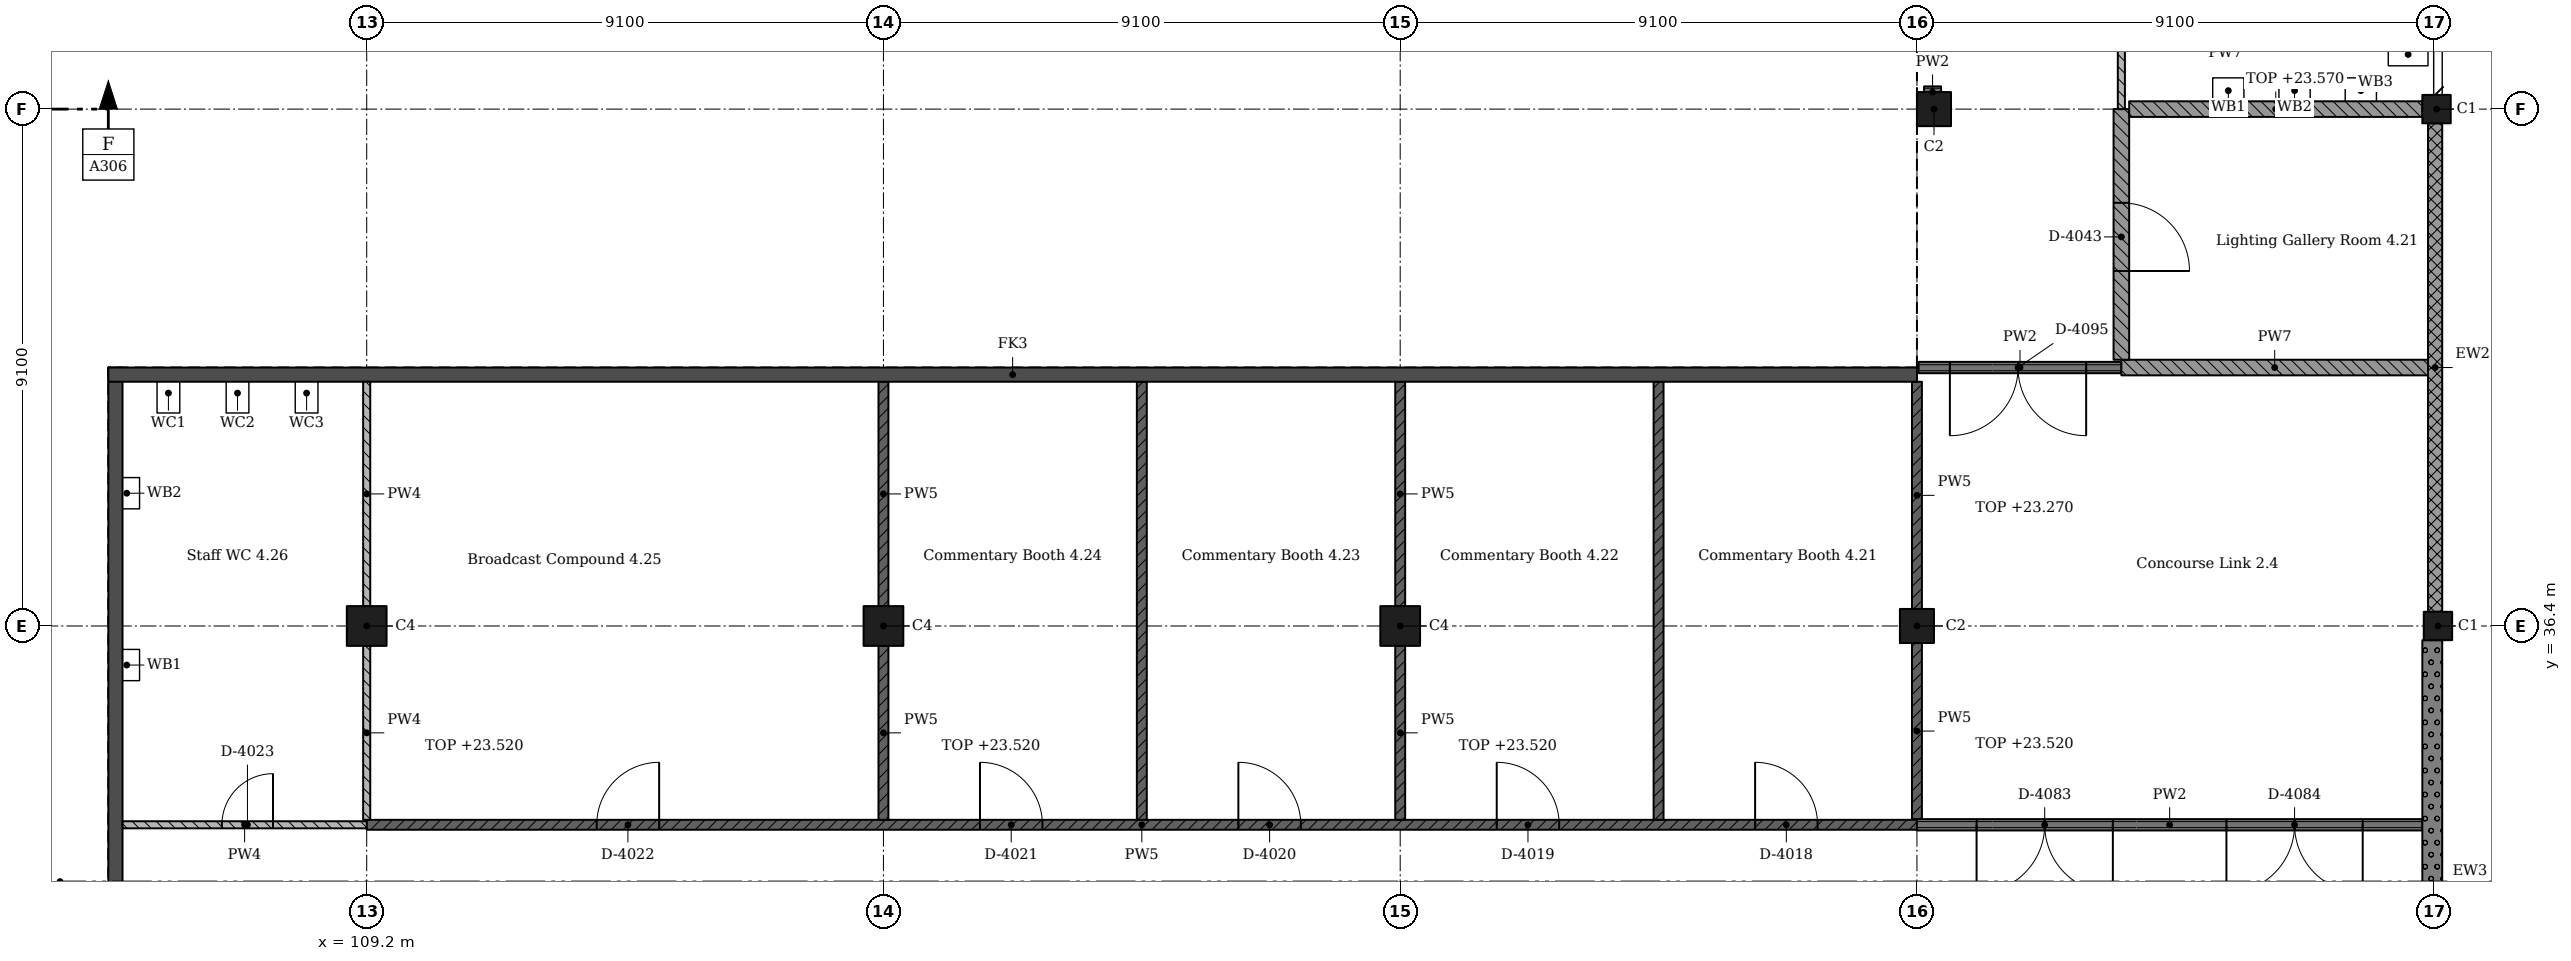
"""IFC4 building model, lengths in metres.
Left out: names, types, materials, properties, quantities, classifications, styles, units other than length and angle.
Written with IfcOpenShell. Run it as: python <this file> out.ifc"""

import sys

from ifc_helpers import new_model, si_unit, direction, frame, frame_2d, origin, origin_2d, place, context, subcontext, project, spatial, rectangle, extrude, element, fill, save


model = new_model("IFC4")
c1 = context("Model", 3, precision=1e-05, world=origin(), true_north=direction((0.0, 1.0)))
c2 = subcontext(c1, "Body", "Model", "MODEL_VIEW")
j1 = project(units=[si_unit("LENGTHUNIT", "METRE"), si_unit("PLANEANGLEUNIT", "RADIAN")], contexts=[c1])
p1 = place(None, origin())
s1 = spatial("IfcSite", under=j1, at=p1, CompositionType="ELEMENT")
p2 = place(p1, origin())
s2 = spatial("IfcBuilding", under=s1, at=p2, CompositionType="ELEMENT")
p3 = place(p2, frame((0.0, 0.0, 20.02)))
s3 = spatial("IfcBuildingStorey", under=s2, at=p3, CompositionType="ELEMENT", Elevation=20.02)
for number, where, z_axis, x_axis in (
    (1, (109.2, 36.4, 0.0), (0.0, 0.0, 1.0), (1.0, 0.0, 0.0)),
    (2, (118.3, 36.4, 0.0), (0.0, 0.0, 1.0), (1.0, 0.0, 0.0)),
    (3, (127.4, 36.4, 0.0), (0.0, 0.0, 1.0), (1.0, 0.0, 0.0)),
):
    element("IfcColumn", number, at=place(p3, frame(where, z_axis=z_axis, x_axis=x_axis)), inside=s3, PredefinedType="COLUMN", context=c2, shape_type="SweptSolid", body=[
        extrude(rectangle(XDim=0.7, YDim=0.7, at=origin_2d()), origin(), (0.0, 0.0, 1.0), 4.55),
    ])
for number, where, z_axis, x_axis in (
    (4, (136.5, 36.4, 0.0), (0.0, 0.0, 1.0), (1.0, 0.0, 0.0)),
    (5, (136.8, 45.5, 0.0), (0.0, 0.0, 1.0), (1.0, 0.0, 0.0)),
):
    element("IfcColumn", number, at=place(p3, frame(where, z_axis=z_axis, x_axis=x_axis)), inside=s3, PredefinedType="COLUMN", context=c2, shape_type="SweptSolid", body=[
        extrude(rectangle(XDim=0.6, YDim=0.6, at=origin_2d()), origin(), (0.0, 0.0, 1.0), 4.55),
    ])
for number, where, z_axis, x_axis in (
    (6, (145.675, 36.4, 0.0), (0.0, 0.0, 1.0), (1.0, 0.0, 0.0)),
    (7, (145.65, 45.5, 0.0), (0.0, 0.0, 1.0), (1.0, 0.0, 0.0)),
):
    element("IfcColumn", number, at=place(p3, frame(where, z_axis=z_axis, x_axis=x_axis)), inside=s3, PredefinedType="COLUMN", context=c2, shape_type="SweptSolid", body=[
        extrude(rectangle(XDim=0.5, YDim=0.5, at=origin_2d()), origin(), (0.0, 0.0, 1.0), 4.55),
    ])
p4 = place(p3, frame((104.775, 40.95, 0.0), z_axis=(0.0, 0.0, 1.0), x_axis=(0.0, -1.0, 0.0)))
e8 = element("IfcWall", 8, at=p4, inside=s3, PredefinedType="SHEAR", context=c2, shape_type="SweptSolid", body=[
    extrude(rectangle(XDim=31.85, YDim=0.25, at=frame_2d((15.925, 0.0))), origin(), (0.0, 0.0, 1.0), 4.55),
])
p5 = place(p3, frame((104.65, 40.825, 0.0), z_axis=(0.0, 0.0, 1.0), x_axis=(1.0, 0.0, 0.0)))
e9 = element("IfcWall", 9, at=p5, inside=s3, PredefinedType="SHEAR", context=c2, shape_type="SweptSolid", body=[
    extrude(rectangle(XDim=31.85, YDim=0.25, at=frame_2d((15.925, 0.0))), origin(), (0.0, 0.0, 1.0), 4.55),
])
p6 = place(p3, frame((145.575, 27.55, 0.0), z_axis=(0.0, 0.0, 1.0), x_axis=(0.0, 1.0, 0.0)))
e10 = element("IfcWall", 10, at=p6, inside=s3, PredefinedType="SOLIDWALL", context=c2, shape_type="SweptSolid", body=[
    extrude(rectangle(XDim=8.6, YDim=0.35, at=frame_2d((4.3, 0.0))), origin(), (0.0, 0.0, 1.0), 3.5),
])
p7 = place(p3, frame((145.625, 36.65, 0.0), z_axis=(0.0, 0.0, 1.0), x_axis=(0.0, 1.0, 0.0)))
e11 = element("IfcWall", 11, at=p7, inside=s3, PredefinedType="SOLIDWALL", context=c2, shape_type="SweptSolid", body=[
    extrude(rectangle(XDim=8.6, YDim=0.25, at=frame_2d((4.3, 0.0))), origin(), (0.0, 0.0, 1.0), 3.5),
])
p8 = place(p3, frame((109.2, 32.9, 0.0), z_axis=(0.0, 0.0, 1.0), x_axis=(-1.0, 0.0, 0.0)))
e12 = element("IfcWall", 12, at=p8, inside=s3, PredefinedType="PARTITIONING", context=c2, shape_type="SweptSolid", body=[
    extrude(rectangle(XDim=4.3, YDim=0.125, at=frame_2d((2.15, 0.0))), origin(), (0.0, 0.0, 1.0), 4.25),
])
p9 = place(p8, frame((1.65, 0.0, 0.0)))
e13 = element("IfcOpeningElement", 13, at=p9, cuts=e12, PredefinedType="OPENING", context=c2, shape_type="SweptSolid", body=[
    extrude(rectangle(XDim=0.9, YDim=2.1, at=frame_2d((0.45, 1.05))), frame((0.0, 0.073, 0.0), z_axis=(0.0, -1.0, 0.0), x_axis=(1.0, 0.0, 0.0)), (0.0, 0.0, 1.0), 0.145),
])
p10 = place(p3, frame((109.2, 32.988, 0.0), z_axis=(0.0, 0.0, 1.0), x_axis=(0.0, 1.0, 0.0)))
e14 = element("IfcWall", 14, at=p10, inside=s3, PredefinedType="PARTITIONING", context=c2, shape_type="SweptSolid", body=[
    extrude(rectangle(XDim=3.062, YDim=0.125, at=frame_2d((1.531, 0.0))), origin(), (0.0, 0.0, 1.0), 3.5),
])
p11 = place(p3, frame((109.2, 36.75, 0.0), z_axis=(0.0, 0.0, 1.0), x_axis=(0.0, 1.0, 0.0)))
e15 = element("IfcWall", 15, at=p11, inside=s3, PredefinedType="PARTITIONING", context=c2, shape_type="SweptSolid", body=[
    extrude(rectangle(XDim=3.95, YDim=0.125, at=frame_2d((1.975, 0.0))), origin(), (0.0, 0.0, 1.0), 4.25),
])
p12 = place(p3, frame((109.2, 32.9, 0.0), z_axis=(0.0, 0.0, 1.0), x_axis=(1.0, 0.0, 0.0)))
e16 = element("IfcWall", 16, at=p12, inside=s3, PredefinedType="PARTITIONING", context=c2, shape_type="SweptSolid", body=[
    extrude(rectangle(XDim=27.3, YDim=0.175, at=frame_2d((13.65, 0.0))), origin(), (0.0, 0.0, 1.0), 4.25),
])
p13 = place(p12, frame((24.45, 0.0, 0.0)))
e17 = element("IfcOpeningElement", 17, at=p13, cuts=e16, PredefinedType="OPENING", context=c2, shape_type="SweptSolid", body=[
    extrude(rectangle(XDim=1.1, YDim=2.4, at=frame_2d((0.55, 1.2))), frame((0.0, 0.097, 0.0), z_axis=(0.0, -1.0, 0.0), x_axis=(1.0, 0.0, 0.0)), (0.0, 0.0, 1.0), 0.195),
])
p14 = place(p12, frame((19.9, 0.0, 0.0)))
e18 = element("IfcOpeningElement", 18, at=p14, cuts=e16, PredefinedType="OPENING", context=c2, shape_type="SweptSolid", body=[
    extrude(rectangle(XDim=1.1, YDim=2.4, at=frame_2d((0.55, 1.2))), frame((0.0, 0.097, 0.0), z_axis=(0.0, -1.0, 0.0), x_axis=(1.0, 0.0, 0.0)), (0.0, 0.0, 1.0), 0.195),
])
p15 = place(p12, frame((15.35, 0.0, 0.0)))
e19 = element("IfcOpeningElement", 19, at=p15, cuts=e16, PredefinedType="OPENING", context=c2, shape_type="SweptSolid", body=[
    extrude(rectangle(XDim=1.1, YDim=2.4, at=frame_2d((0.55, 1.2))), frame((0.0, 0.097, 0.0), z_axis=(0.0, -1.0, 0.0), x_axis=(1.0, 0.0, 0.0)), (0.0, 0.0, 1.0), 0.195),
])
p16 = place(p12, frame((10.8, 0.0, 0.0)))
e20 = element("IfcOpeningElement", 20, at=p16, cuts=e16, PredefinedType="OPENING", context=c2, shape_type="SweptSolid", body=[
    extrude(rectangle(XDim=1.1, YDim=2.4, at=frame_2d((0.55, 1.2))), frame((0.0, 0.097, 0.0), z_axis=(0.0, -1.0, 0.0), x_axis=(1.0, 0.0, 0.0)), (0.0, 0.0, 1.0), 0.195),
])
p17 = place(p12, frame((4.05, 0.0, 0.0)))
e21 = element("IfcOpeningElement", 21, at=p17, cuts=e16, PredefinedType="OPENING", context=c2, shape_type="SweptSolid", body=[
    extrude(rectangle(XDim=1.1, YDim=2.4, at=frame_2d((0.55, 1.2))), frame((0.0, 0.097, 0.0), z_axis=(0.0, -1.0, 0.0), x_axis=(1.0, 0.0, 0.0)), (0.0, 0.0, 1.0), 0.195),
])
p18 = place(p3, frame((118.3, 32.988, 0.0), z_axis=(0.0, 0.0, 1.0), x_axis=(0.0, 1.0, 0.0)))
e22 = element("IfcWall", 22, at=p18, inside=s3, PredefinedType="PARTITIONING", context=c2, shape_type="SweptSolid", body=[
    extrude(rectangle(XDim=3.062, YDim=0.175, at=frame_2d((1.531, 0.0))), origin(), (0.0, 0.0, 1.0), 3.5),
])
p19 = place(p3, frame((118.3, 36.75, 0.0), z_axis=(0.0, 0.0, 1.0), x_axis=(0.0, 1.0, 0.0)))
e23 = element("IfcWall", 23, at=p19, inside=s3, PredefinedType="PARTITIONING", context=c2, shape_type="SweptSolid", body=[
    extrude(rectangle(XDim=3.95, YDim=0.175, at=frame_2d((1.975, 0.0))), origin(), (0.0, 0.0, 1.0), 4.25),
])
p20 = place(p3, frame((122.85, 32.988, 0.0), z_axis=(0.0, 0.0, 1.0), x_axis=(0.0, 1.0, 0.0)))
e24 = element("IfcWall", 24, at=p20, inside=s3, PredefinedType="PARTITIONING", context=c2, shape_type="SweptSolid", body=[
    extrude(rectangle(XDim=7.712, YDim=0.175, at=frame_2d((3.856, 0.0))), origin(), (0.0, 0.0, 1.0), 4.25),
])
p21 = place(p3, frame((127.4, 32.988, 0.0), z_axis=(0.0, 0.0, 1.0), x_axis=(0.0, 1.0, 0.0)))
e25 = element("IfcWall", 25, at=p21, inside=s3, PredefinedType="PARTITIONING", context=c2, shape_type="SweptSolid", body=[
    extrude(rectangle(XDim=3.062, YDim=0.175, at=frame_2d((1.531, 0.0))), origin(), (0.0, 0.0, 1.0), 3.5),
])
p22 = place(p3, frame((127.4, 36.75, 0.0), z_axis=(0.0, 0.0, 1.0), x_axis=(0.0, 1.0, 0.0)))
e26 = element("IfcWall", 26, at=p22, inside=s3, PredefinedType="PARTITIONING", context=c2, shape_type="SweptSolid", body=[
    extrude(rectangle(XDim=3.95, YDim=0.175, at=frame_2d((1.975, 0.0))), origin(), (0.0, 0.0, 1.0), 4.25),
])
p23 = place(p3, frame((131.95, 32.988, 0.0), z_axis=(0.0, 0.0, 1.0), x_axis=(0.0, 1.0, 0.0)))
e27 = element("IfcWall", 27, at=p23, inside=s3, PredefinedType="PARTITIONING", context=c2, shape_type="SweptSolid", body=[
    extrude(rectangle(XDim=7.712, YDim=0.175, at=frame_2d((3.856, 0.0))), origin(), (0.0, 0.0, 1.0), 4.25),
])
p24 = place(p3, frame((136.5, 32.9, 0.0), z_axis=(0.0, 0.0, 1.0), x_axis=(1.0, 0.0, 0.0)))
e28 = element("IfcWall", 28, at=p24, inside=s3, PredefinedType="PARTITIONING", context=c2, shape_type="SweptSolid", body=[
    extrude(rectangle(XDim=8.9, YDim=0.2, at=frame_2d((4.45, 0.0))), origin(), (0.0, 0.0, 1.0), 4.25),
])
p25 = place(p24, frame((1.05, 0.0, 0.0)))
e29 = element("IfcOpeningElement", 29, at=p25, cuts=e28, PredefinedType="OPENING", context=c2, shape_type="SweptSolid", body=[
    extrude(rectangle(XDim=2.4, YDim=2.4, at=frame_2d((1.2, 1.2))), frame((0.0, 0.11, 0.0), z_axis=(0.0, -1.0, 0.0), x_axis=(1.0, 0.0, 0.0)), (0.0, 0.0, 1.0), 0.22),
])
p26 = place(p24, frame((5.45, 0.0, 0.0)))
e30 = element("IfcOpeningElement", 30, at=p26, cuts=e28, PredefinedType="OPENING", context=c2, shape_type="SweptSolid", body=[
    extrude(rectangle(XDim=2.4, YDim=2.4, at=frame_2d((1.2, 1.2))), frame((0.0, 0.11, 0.0), z_axis=(0.0, -1.0, 0.0), x_axis=(1.0, 0.0, 0.0)), (0.0, 0.0, 1.0), 0.22),
])
p27 = place(p3, frame((136.5, 36.1, 0.0), z_axis=(0.0, 0.0, 1.0), x_axis=(0.0, -1.0, 0.0)))
e31 = element("IfcWall", 31, at=p27, inside=s3, PredefinedType="PARTITIONING", context=c2, shape_type="SweptSolid", body=[
    extrude(rectangle(XDim=3.1, YDim=0.175, at=frame_2d((1.55, 0.0))), origin(), (0.0, 0.0, 1.0), 3.5),
])
p28 = place(p3, frame((136.5, 40.7, 0.0), z_axis=(0.0, 0.0, 1.0), x_axis=(0.0, -1.0, 0.0)))
e32 = element("IfcWall", 32, at=p28, inside=s3, PredefinedType="PARTITIONING", context=c2, shape_type="SweptSolid", body=[
    extrude(rectangle(XDim=4.0, YDim=0.175, at=frame_2d((2.0, 0.0))), origin(), (0.0, 0.0, 1.0), 3.25),
])
p29 = place(p3, frame((136.53, 40.95, 0.0), z_axis=(0.0, 0.0, 1.0), x_axis=(1.0, 0.0, 0.0)))
e33 = element("IfcWall", 33, at=p29, inside=s3, PredefinedType="PARTITIONING", context=c2, shape_type="SweptSolid", body=[
    extrude(rectangle(XDim=3.57, YDim=0.2, at=frame_2d((1.785, 0.0))), origin(), (0.0, 0.0, 1.0), 4.25),
])
p30 = place(p29, frame((0.55, 0.0, 0.0)))
e34 = element("IfcOpeningElement", 34, at=p30, cuts=e33, PredefinedType="OPENING", context=c2, shape_type="SweptSolid", body=[
    extrude(rectangle(XDim=2.4, YDim=2.4, at=frame_2d((1.2, 1.2))), frame((0.0, 0.11, 0.0), z_axis=(0.0, -1.0, 0.0), x_axis=(1.0, 0.0, 0.0)), (0.0, 0.0, 1.0), 0.22),
])
p31 = place(p3, frame((136.925, 45.8, 0.0), z_axis=(0.0, 0.0, 1.0), x_axis=(-1.0, 0.0, 0.0)))
e35 = element("IfcWall", 35, at=p31, inside=s3, PredefinedType="PARTITIONING", context=c2, shape_type="SweptSolid", body=[
    extrude(rectangle(XDim=0.3, YDim=0.2, at=frame_2d((0.15, 0.0))), origin(), (0.0, 0.0, 1.0), 4.25),
])
p32 = place(p3, frame((140.1, 40.95, 0.0), z_axis=(0.0, 0.0, 1.0), x_axis=(1.0, 0.0, 0.0)))
e36 = element("IfcWall", 36, at=p32, inside=s3, PredefinedType="SOLIDWALL", context=c2, shape_type="SweptSolid", body=[
    extrude(rectangle(XDim=5.4, YDim=0.275, at=frame_2d((2.7, 0.0))), origin(), (0.0, 0.0, 1.0), 4.25),
])
p33 = place(p3, frame((140.1, 45.5, 0.0), z_axis=(0.0, 0.0, 1.0), x_axis=(0.0, -1.0, 0.0)))
e37 = element("IfcWall", 37, at=p33, inside=s3, PredefinedType="SOLIDWALL", context=c2, shape_type="SweptSolid", body=[
    extrude(rectangle(XDim=4.413, YDim=0.275, at=frame_2d((2.206, 0.0))), origin(), (0.0, 0.0, 1.0), 4.25),
])
p34 = place(p33, frame((1.65, 0.0, 0.0)))
e38 = element("IfcOpeningElement", 38, at=p34, cuts=e37, PredefinedType="OPENING", context=c2, shape_type="SweptSolid", body=[
    extrude(rectangle(XDim=1.2, YDim=2.4, at=frame_2d((0.6, 1.2))), frame((0.0, 0.147, 0.0), z_axis=(0.0, -1.0, 0.0), x_axis=(1.0, 0.0, 0.0)), (0.0, 0.0, 1.0), 0.295),
])
p35 = place(p3, frame((140.1, 54.6, 0.0), z_axis=(0.0, 0.0, 1.0), x_axis=(0.0, -1.0, 0.0)))
e39 = element("IfcWall", 39, at=p35, inside=s3, PredefinedType="PARTITIONING", context=c2, shape_type="SweptSolid", body=[
    extrude(rectangle(XDim=9.1, YDim=0.125, at=frame_2d((4.55, 0.0))), origin(), (0.0, 0.0, 1.0), 4.25),
])
p36 = place(p35, frame((4.05, 0.0, 0.0)))
e40 = element("IfcOpeningElement", 40, at=p36, cuts=e39, PredefinedType="OPENING", context=c2, shape_type="SweptSolid", body=[
    extrude(rectangle(XDim=0.9, YDim=2.1, at=frame_2d((0.45, 1.05))), frame((0.0, 0.073, 0.0), z_axis=(0.0, -1.0, 0.0), x_axis=(1.0, 0.0, 0.0)), (0.0, 0.0, 1.0), 0.145),
])
p37 = place(p3, frame((140.238, 45.5, 0.0), z_axis=(0.0, 0.0, 1.0), x_axis=(1.0, 0.0, 0.0)))
e41 = element("IfcWall", 41, at=p37, inside=s3, PredefinedType="SOLIDWALL", context=c2, shape_type="SweptSolid", body=[
    extrude(rectangle(XDim=5.162, YDim=0.275, at=frame_2d((2.581, 0.0))), origin(), (0.0, 0.0, 1.0), 3.55),
])
p38 = place(p13, origin())
e42 = element("IfcDoor", 42, at=p38, inside=s3, OperationType="SINGLE_SWING_RIGHT", PredefinedType="DOOR", context=c2, shape_type="SweptSolid", body=[
    extrude(rectangle(XDim=1.1, YDim=2.4, at=frame_2d((0.55, 1.2))), frame((0.0, 0.025, 0.0), z_axis=(0.0, -1.0, 0.0), x_axis=(1.0, 0.0, 0.0)), (0.0, 0.0, 1.0), 0.05),
])
fill(e17, e42)
p39 = place(p14, origin())
e43 = element("IfcDoor", 43, at=p39, inside=s3, OperationType="SINGLE_SWING_RIGHT", PredefinedType="DOOR", context=c2, shape_type="SweptSolid", body=[
    extrude(rectangle(XDim=1.1, YDim=2.4, at=frame_2d((0.55, 1.2))), frame((0.0, 0.025, 0.0), z_axis=(0.0, -1.0, 0.0), x_axis=(1.0, 0.0, 0.0)), (0.0, 0.0, 1.0), 0.05),
])
fill(e18, e43)
p40 = place(p15, origin())
e44 = element("IfcDoor", 44, at=p40, inside=s3, OperationType="SINGLE_SWING_RIGHT", PredefinedType="DOOR", context=c2, shape_type="SweptSolid", body=[
    extrude(rectangle(XDim=1.1, YDim=2.4, at=frame_2d((0.55, 1.2))), frame((0.0, 0.025, 0.0), z_axis=(0.0, -1.0, 0.0), x_axis=(1.0, 0.0, 0.0)), (0.0, 0.0, 1.0), 0.05),
])
fill(e19, e44)
p41 = place(p16, origin())
e45 = element("IfcDoor", 45, at=p41, inside=s3, OperationType="SINGLE_SWING_RIGHT", PredefinedType="DOOR", context=c2, shape_type="SweptSolid", body=[
    extrude(rectangle(XDim=1.1, YDim=2.4, at=frame_2d((0.55, 1.2))), frame((0.0, 0.025, 0.0), z_axis=(0.0, -1.0, 0.0), x_axis=(1.0, 0.0, 0.0)), (0.0, 0.0, 1.0), 0.05),
])
fill(e20, e45)
p42 = place(p17, origin())
e46 = element("IfcDoor", 46, at=p42, inside=s3, OperationType="SINGLE_SWING_LEFT", PredefinedType="DOOR", context=c2, shape_type="SweptSolid", body=[
    extrude(rectangle(XDim=1.1, YDim=2.4, at=frame_2d((0.55, 1.2))), frame((0.0, 0.025, 0.0), z_axis=(0.0, -1.0, 0.0), x_axis=(1.0, 0.0, 0.0)), (0.0, 0.0, 1.0), 0.05),
])
fill(e21, e46)
p43 = place(p9, origin())
e47 = element("IfcDoor", 47, at=p43, inside=s3, OperationType="SINGLE_SWING_LEFT", PredefinedType="DOOR", context=c2, shape_type="SweptSolid", body=[
    extrude(rectangle(XDim=0.9, YDim=2.1, at=frame_2d((0.45, 1.05))), frame((0.0, 0.025, 0.0), z_axis=(0.0, -1.0, 0.0), x_axis=(1.0, 0.0, 0.0)), (0.0, 0.0, 1.0), 0.05),
])
fill(e13, e47)
p44 = place(p34, origin())
e48 = element("IfcDoor", 48, at=p44, inside=s3, OperationType="SINGLE_SWING_LEFT", PredefinedType="DOOR", context=c2, shape_type="SweptSolid", body=[
    extrude(rectangle(XDim=1.2, YDim=2.4, at=frame_2d((0.6, 1.2))), frame((0.0, 0.025, 0.0), z_axis=(0.0, -1.0, 0.0), x_axis=(1.0, 0.0, 0.0)), (0.0, 0.0, 1.0), 0.05),
])
fill(e38, e48)
p45 = place(p25, origin())
e49 = element("IfcDoor", 49, at=p45, inside=s3, OperationType="DOUBLE_DOOR_SINGLE_SWING", PredefinedType="DOOR", context=c2, shape_type="SweptSolid", body=[
    extrude(rectangle(XDim=2.4, YDim=2.4, at=frame_2d((1.2, 1.2))), frame((0.0, 0.025, 0.0), z_axis=(0.0, -1.0, 0.0), x_axis=(1.0, 0.0, 0.0)), (0.0, 0.0, 1.0), 0.05),
])
fill(e29, e49)
p46 = place(p26, origin())
e50 = element("IfcDoor", 50, at=p46, inside=s3, OperationType="DOUBLE_DOOR_SINGLE_SWING", PredefinedType="DOOR", context=c2, shape_type="SweptSolid", body=[
    extrude(rectangle(XDim=2.4, YDim=2.4, at=frame_2d((1.2, 1.2))), frame((0.0, 0.025, 0.0), z_axis=(0.0, -1.0, 0.0), x_axis=(1.0, 0.0, 0.0)), (0.0, 0.0, 1.0), 0.05),
])
fill(e30, e50)
p47 = place(p30, origin())
e51 = element("IfcDoor", 51, at=p47, inside=s3, OperationType="DOUBLE_DOOR_SINGLE_SWING", PredefinedType="DOOR", context=c2, shape_type="SweptSolid", body=[
    extrude(rectangle(XDim=2.4, YDim=2.4, at=frame_2d((1.2, 1.2))), frame((0.0, 0.025, 0.0), z_axis=(0.0, -1.0, 0.0), x_axis=(1.0, 0.0, 0.0)), (0.0, 0.0, 1.0), 0.05),
])
fill(e34, e51)
save(model, sys.argv[1])
